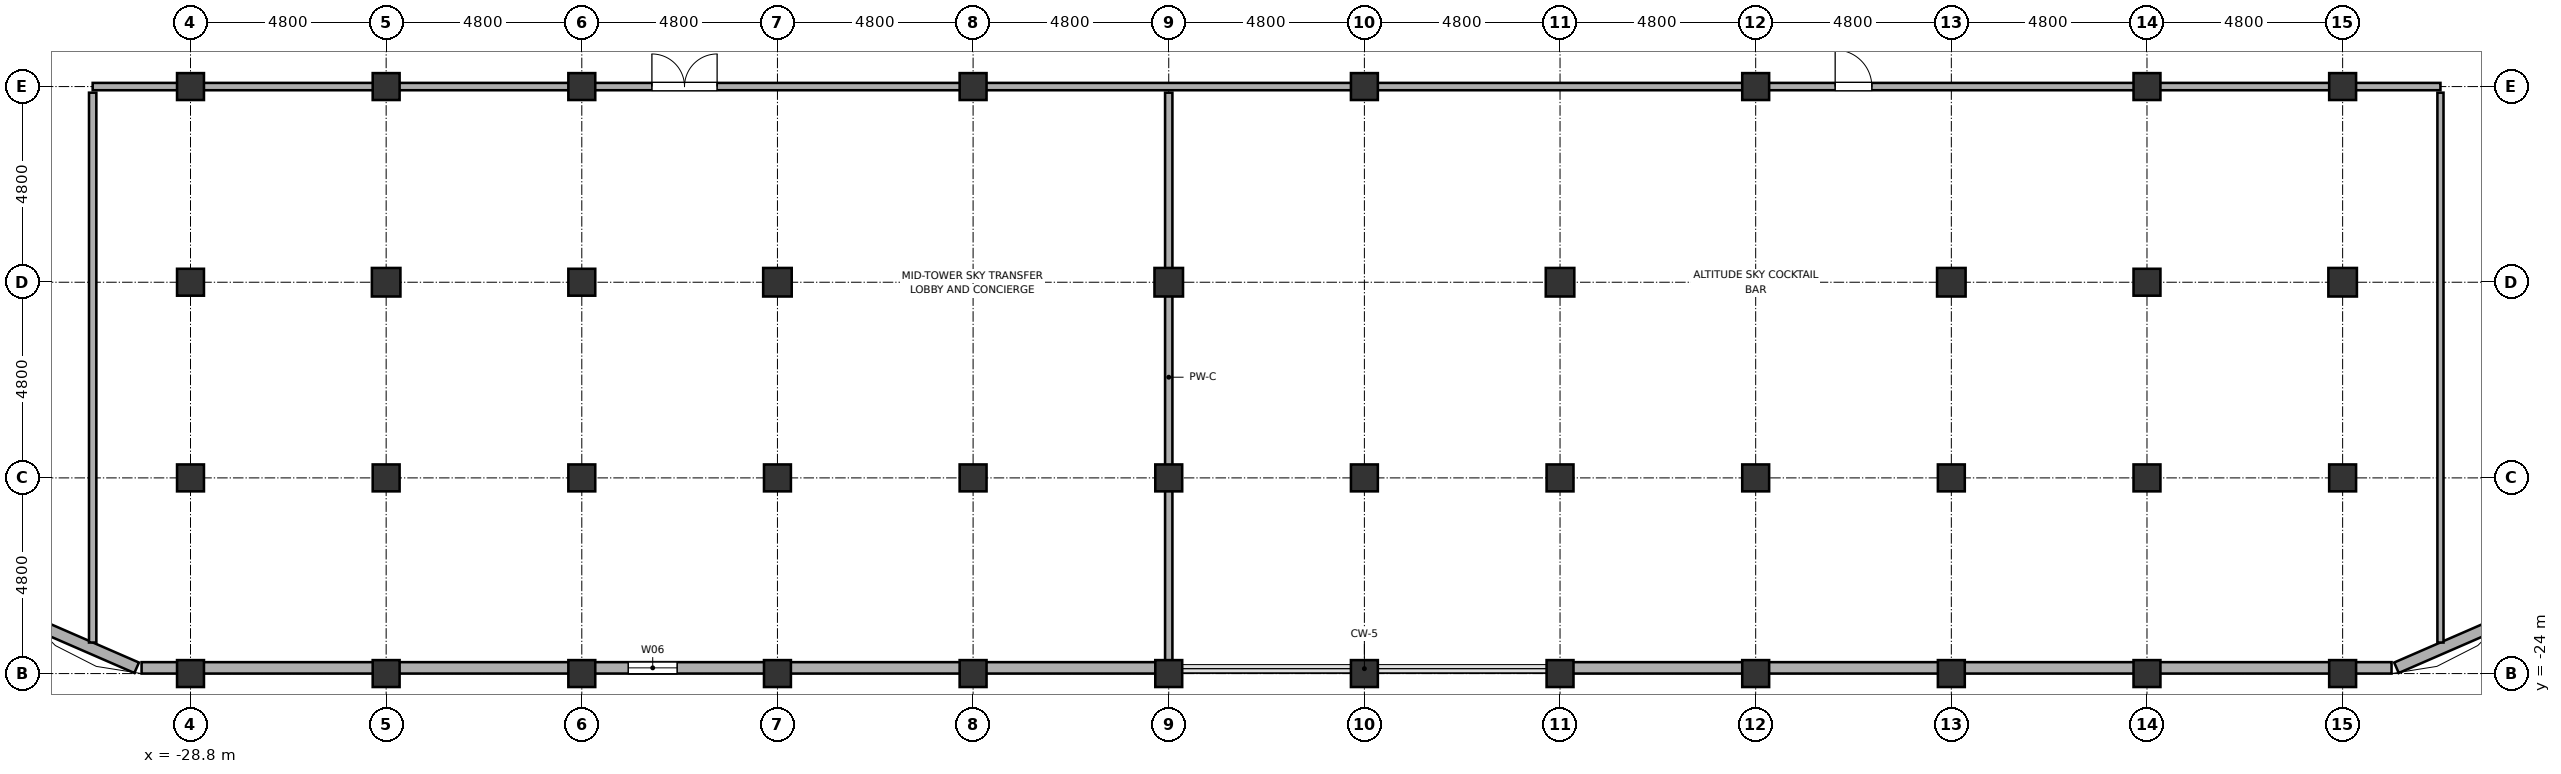
"""IFC4 building model, lengths in metres.
Left out: names, types, materials, properties, quantities, classifications, styles, units other than length and angle.
Written with IfcOpenShell. Run it as: python <this file> out.ifc"""

import sys

from ifc_helpers import new_model, si_unit, direction, frame, frame_2d, origin, origin_2d, place, context, subcontext, project, spatial, rectangle, hollow_rectangle, hollow_circle, extrude, element, fill, save


model = new_model("IFC4")
c1 = context("Model", 3, precision=1e-05, world=origin(), true_north=direction((0.0, 1.0)))
c2 = subcontext(c1, "Body", "Model", "MODEL_VIEW")
j1 = project(units=[si_unit("LENGTHUNIT", "METRE"), si_unit("PLANEANGLEUNIT", "RADIAN")], contexts=[c1])
p1 = place(None, origin())
s1 = spatial("IfcSite", under=j1, at=p1, CompositionType="ELEMENT")
p2 = place(p1, origin())
s2 = spatial("IfcBuilding", under=s1, at=p2, CompositionType="ELEMENT")
p3 = place(p2, frame((0.0, 0.0, 180.3)))
s3 = spatial("IfcBuildingStorey", under=s2, at=p3, CompositionType="ELEMENT", Elevation=180.3)
for number, where, z_axis, x_axis in (
    (1, (-28.8, -24.0, 0.0), (0.0, 0.0, 1.0), (1.0, 0.0, 0.0)),
    (2, (-28.8, -19.2, 0.0), (0.0, 0.0, 1.0), (1.0, 0.0, 0.0)),
    (3, (-28.8, -14.4, 0.0), (0.0, 0.0, 1.0), (1.0, 0.0, 0.0)),
    (4, (-28.8, -9.6, 0.0), (0.0, 0.0, 1.0), (1.0, 0.0, 0.0)),
    (5, (-24.0, -24.0, 0.0), (0.0, 0.0, 1.0), (1.0, 0.0, 0.0)),
    (6, (-24.0, -19.2, 0.0), (0.0, 0.0, 1.0), (1.0, 0.0, 0.0)),
):
    element("IfcColumn", number, at=place(p3, frame(where, z_axis=z_axis, x_axis=x_axis)), inside=s3, PredefinedType="COLUMN", context=c2, shape_type="SweptSolid", body=[
        extrude(hollow_circle(Radius=0.33, WallThickness=0.028, at=origin_2d()), origin(), (0.0, 0.0, 1.0), 5.2),
    ])
p4 = place(p3, frame((-24.0, -14.4, 0.0), z_axis=(0.0, 0.0, 1.0), x_axis=(1.0, 0.0, 0.0)))
e7 = element("IfcColumn", 7, at=p4, inside=s3, PredefinedType="COLUMN", context=c2, shape_type="SweptSolid", body=[
    extrude(hollow_rectangle(XDim=0.7, YDim=0.7, WallThickness=0.032, at=origin_2d()), origin(), (0.0, 0.0, 1.0), 5.2),
])
for number, where, z_axis, x_axis in (
    (8, (-24.0, -9.6, 0.0), (0.0, 0.0, 1.0), (1.0, 0.0, 0.0)),
    (9, (-19.2, -24.0, 0.0), (0.0, 0.0, 1.0), (1.0, 0.0, 0.0)),
    (10, (-19.2, -19.2, 0.0), (0.0, 0.0, 1.0), (1.0, 0.0, 0.0)),
    (11, (-19.2, -14.4, 0.0), (0.0, 0.0, 1.0), (1.0, 0.0, 0.0)),
    (12, (-19.2, -9.6, 0.0), (0.0, 0.0, 1.0), (1.0, 0.0, 0.0)),
    (13, (-14.4, -24.0, 0.0), (0.0, 0.0, 1.0), (1.0, 0.0, 0.0)),
    (14, (-14.4, -19.2, 0.0), (0.0, 0.0, 1.0), (1.0, 0.0, 0.0)),
):
    element("IfcColumn", number, at=place(p3, frame(where, z_axis=z_axis, x_axis=x_axis)), inside=s3, PredefinedType="COLUMN", context=c2, shape_type="SweptSolid", body=[
        extrude(hollow_circle(Radius=0.33, WallThickness=0.028, at=origin_2d()), origin(), (0.0, 0.0, 1.0), 5.2),
    ])
p5 = place(p3, frame((-14.4, -14.4, 0.0), z_axis=(0.0, 0.0, 1.0), x_axis=(1.0, 0.0, 0.0)))
e15 = element("IfcColumn", 15, at=p5, inside=s3, PredefinedType="COLUMN", context=c2, shape_type="SweptSolid", body=[
    extrude(hollow_rectangle(XDim=0.7, YDim=0.7, WallThickness=0.032, at=origin_2d()), origin(), (0.0, 0.0, 1.0), 5.2),
])
for number, where, z_axis, x_axis in (
    (16, (-9.6, -24.0, 0.0), (0.0, 0.0, 1.0), (1.0, 0.0, 0.0)),
    (17, (-9.6, -19.2, 0.0), (0.0, 0.0, 1.0), (1.0, 0.0, 0.0)),
    (18, (-9.6, -9.6, 0.0), (0.0, 0.0, 1.0), (1.0, 0.0, 0.0)),
    (19, (-4.8, -24.0, 0.0), (0.0, 0.0, 1.0), (1.0, 0.0, 0.0)),
    (20, (-4.8, -19.2, 0.0), (0.0, 0.0, 1.0), (1.0, 0.0, 0.0)),
):
    element("IfcColumn", number, at=place(p3, frame(where, z_axis=z_axis, x_axis=x_axis)), inside=s3, PredefinedType="COLUMN", context=c2, shape_type="SweptSolid", body=[
        extrude(hollow_circle(Radius=0.33, WallThickness=0.028, at=origin_2d()), origin(), (0.0, 0.0, 1.0), 5.2),
    ])
p6 = place(p3, frame((-4.8, -14.4, 0.0), z_axis=(0.0, 0.0, 1.0), x_axis=(1.0, 0.0, 0.0)))
e21 = element("IfcColumn", 21, at=p6, inside=s3, PredefinedType="COLUMN", context=c2, shape_type="SweptSolid", body=[
    extrude(hollow_rectangle(XDim=0.7, YDim=0.7, WallThickness=0.032, at=origin_2d()), origin(), (0.0, 0.0, 1.0), 5.2),
])
for number, where, z_axis, x_axis in (
    (22, (0.0, -24.0, 0.0), (0.0, 0.0, 1.0), (1.0, 0.0, 0.0)),
    (23, (0.0, -19.2, 0.0), (0.0, 0.0, 1.0), (1.0, 0.0, 0.0)),
    (24, (0.0, -9.6, 0.0), (0.0, 0.0, 1.0), (1.0, 0.0, 0.0)),
    (25, (4.8, -24.0, 0.0), (0.0, 0.0, 1.0), (1.0, 0.0, 0.0)),
    (26, (4.8, -19.2, 0.0), (0.0, 0.0, 1.0), (1.0, 0.0, 0.0)),
):
    element("IfcColumn", number, at=place(p3, frame(where, z_axis=z_axis, x_axis=x_axis)), inside=s3, PredefinedType="COLUMN", context=c2, shape_type="SweptSolid", body=[
        extrude(hollow_circle(Radius=0.33, WallThickness=0.028, at=origin_2d()), origin(), (0.0, 0.0, 1.0), 5.2),
    ])
p7 = place(p3, frame((4.8, -14.4, 0.0), z_axis=(0.0, 0.0, 1.0), x_axis=(1.0, 0.0, 0.0)))
e27 = element("IfcColumn", 27, at=p7, inside=s3, PredefinedType="COLUMN", context=c2, shape_type="SweptSolid", body=[
    extrude(hollow_rectangle(XDim=0.7, YDim=0.7, WallThickness=0.032, at=origin_2d()), origin(), (0.0, 0.0, 1.0), 5.2),
])
for number, where, z_axis, x_axis in (
    (28, (9.6, -24.0, 0.0), (0.0, 0.0, 1.0), (1.0, 0.0, 0.0)),
    (29, (9.6, -19.2, 0.0), (0.0, 0.0, 1.0), (1.0, 0.0, 0.0)),
    (30, (9.6, -9.6, 0.0), (0.0, 0.0, 1.0), (1.0, 0.0, 0.0)),
    (31, (14.4, -24.0, 0.0), (0.0, 0.0, 1.0), (1.0, 0.0, 0.0)),
    (32, (14.4, -19.2, 0.0), (0.0, 0.0, 1.0), (1.0, 0.0, 0.0)),
):
    element("IfcColumn", number, at=place(p3, frame(where, z_axis=z_axis, x_axis=x_axis)), inside=s3, PredefinedType="COLUMN", context=c2, shape_type="SweptSolid", body=[
        extrude(hollow_circle(Radius=0.33, WallThickness=0.028, at=origin_2d()), origin(), (0.0, 0.0, 1.0), 5.2),
    ])
p8 = place(p3, frame((14.4, -14.4, 0.0), z_axis=(0.0, 0.0, 1.0), x_axis=(1.0, 0.0, 0.0)))
e33 = element("IfcColumn", 33, at=p8, inside=s3, PredefinedType="COLUMN", context=c2, shape_type="SweptSolid", body=[
    extrude(hollow_rectangle(XDim=0.7, YDim=0.7, WallThickness=0.032, at=origin_2d()), origin(), (0.0, 0.0, 1.0), 5.2),
])
for number, where, z_axis, x_axis in (
    (34, (19.2, -24.0, 0.0), (0.0, 0.0, 1.0), (1.0, 0.0, 0.0)),
    (35, (19.2, -19.2, 0.0), (0.0, 0.0, 1.0), (1.0, 0.0, 0.0)),
    (36, (19.2, -14.4, 0.0), (0.0, 0.0, 1.0), (1.0, 0.0, 0.0)),
    (37, (19.2, -9.6, 0.0), (0.0, 0.0, 1.0), (1.0, 0.0, 0.0)),
    (38, (24.0, -24.0, 0.0), (0.0, 0.0, 1.0), (1.0, 0.0, 0.0)),
    (39, (24.0, -19.2, 0.0), (0.0, 0.0, 1.0), (1.0, 0.0, 0.0)),
):
    element("IfcColumn", number, at=place(p3, frame(where, z_axis=z_axis, x_axis=x_axis)), inside=s3, PredefinedType="COLUMN", context=c2, shape_type="SweptSolid", body=[
        extrude(hollow_circle(Radius=0.33, WallThickness=0.028, at=origin_2d()), origin(), (0.0, 0.0, 1.0), 5.2),
    ])
p9 = place(p3, frame((24.0, -14.4, 0.0), z_axis=(0.0, 0.0, 1.0), x_axis=(1.0, 0.0, 0.0)))
e40 = element("IfcColumn", 40, at=p9, inside=s3, PredefinedType="COLUMN", context=c2, shape_type="SweptSolid", body=[
    extrude(hollow_rectangle(XDim=0.7, YDim=0.7, WallThickness=0.032, at=origin_2d()), origin(), (0.0, 0.0, 1.0), 5.2),
])
p10 = place(p3, frame((24.0, -9.6, 0.0), z_axis=(0.0, 0.0, 1.0), x_axis=(1.0, 0.0, 0.0)))
e41 = element("IfcColumn", 41, at=p10, inside=s3, PredefinedType="COLUMN", context=c2, shape_type="SweptSolid", body=[
    extrude(hollow_circle(Radius=0.33, WallThickness=0.028, at=origin_2d()), origin(), (0.0, 0.0, 1.0), 5.2),
])
for number, where, z_axis, x_axis in (
    (42, (-32.447, -22.847, 0.0), (0.0, 0.0, 1.0), (0.917, -0.399, 0.0)),
    (43, (25.321, -23.858, 0.0), (0.0, 0.0, 1.0), (0.917, 0.399, 0.0)),
):
    element("IfcWall", number, at=place(p3, frame(where, z_axis=z_axis, x_axis=x_axis)), inside=s3, PredefinedType="SOLIDWALL", context=c2, shape_type="SweptSolid", body=[
        extrude(rectangle(XDim=2.536, YDim=0.28, at=frame_2d((1.268, 0.0))), origin(), (0.0, 0.0, 1.0), 3.55),
    ])
p11 = place(p3, frame((-30.0, -23.86, 0.0), z_axis=(0.0, 0.0, 1.0), x_axis=(1.0, 0.0, 0.0)))
e44 = element("IfcWall", 44, at=p11, inside=s3, PredefinedType="SOLIDWALL", context=c2, shape_type="SweptSolid", body=[
    extrude(rectangle(XDim=25.25, YDim=0.28, at=frame_2d((12.625, 0.0))), origin(), (0.0, 0.0, 1.0), 3.55),
])
p12 = place(p11, frame((11.94, 0.0, 0.75)))
e45 = element("IfcOpeningElement", 45, at=p12, cuts=e44, PredefinedType="OPENING", context=c2, shape_type="SweptSolid", body=[
    extrude(rectangle(XDim=1.2, YDim=1.7, at=frame_2d((0.6, 0.85))), frame((0.0, 0.155, 0.0), z_axis=(0.0, -1.0, 0.0), x_axis=(1.0, 0.0, 0.0)), (0.0, 0.0, 1.0), 0.31),
])
p13 = place(p3, frame((4.75, -23.86, 0.0), z_axis=(0.0, 0.0, 1.0), x_axis=(1.0, 0.0, 0.0)))
e46 = element("IfcWall", 46, at=p13, inside=s3, PredefinedType="SOLIDWALL", context=c2, shape_type="SweptSolid", body=[
    extrude(rectangle(XDim=20.45, YDim=0.28, at=frame_2d((10.225, 0.0))), origin(), (0.0, 0.0, 1.0), 3.55),
])
p14 = place(p3, frame((-31.2, -9.6, 0.0), z_axis=(0.0, 0.0, 1.0), x_axis=(1.0, 0.0, 0.0)))
e47 = element("IfcWall", 47, at=p14, inside=s3, PredefinedType="PARTITIONING", context=c2, shape_type="SweptSolid", body=[
    extrude(rectangle(XDim=57.6, YDim=0.18, at=frame_2d((28.8, 0.0))), origin(), (0.0, 0.0, 1.0), 3.55),
])
p15 = place(p14, frame((13.72, 0.0, 0.0)))
e48 = element("IfcOpeningElement", 48, at=p15, cuts=e47, PredefinedType="OPENING", context=c2, shape_type="SweptSolid", body=[
    extrude(rectangle(XDim=1.6, YDim=2.3, at=frame_2d((0.8, 1.15))), frame((0.0, 0.105, 0.0), z_axis=(0.0, -1.0, 0.0), x_axis=(1.0, 0.0, 0.0)), (0.0, 0.0, 1.0), 0.21),
])
p16 = place(p14, frame((42.75, 0.0, 0.0)))
e49 = element("IfcOpeningElement", 49, at=p16, cuts=e47, PredefinedType="OPENING", context=c2, shape_type="SweptSolid", body=[
    extrude(rectangle(XDim=0.9, YDim=2.1, at=frame_2d((0.45, 1.05))), frame((0.0, 0.105, 0.0), z_axis=(0.0, -1.0, 0.0), x_axis=(1.0, 0.0, 0.0)), (0.0, 0.0, 1.0), 0.21),
])
p17 = place(p3, frame((-31.2, -23.239, 0.0), z_axis=(0.0, 0.0, 1.0), x_axis=(0.0, 1.0, 0.0)))
e50 = element("IfcWall", 50, at=p17, inside=s3, PredefinedType="PARTITIONING", context=c2, shape_type="SweptSolid", body=[
    extrude(rectangle(XDim=13.489, YDim=0.18, at=frame_2d((6.744, 0.0))), origin(), (0.0, 0.0, 1.0), 3.55),
])
p18 = place(p3, frame((-4.8, -23.71, 0.0), z_axis=(0.0, 0.0, 1.0), x_axis=(0.0, 1.0, 0.0)))
e51 = element("IfcWall", 51, at=p18, inside=s3, PredefinedType="PARTITIONING", context=c2, shape_type="SweptSolid", body=[
    extrude(rectangle(XDim=13.96, YDim=0.18, at=frame_2d((6.98, 0.0))), origin(), (0.0, 0.0, 1.0), 3.55),
])
p19 = place(p3, frame((26.4, -23.239, 0.0), z_axis=(0.0, 0.0, 1.0), x_axis=(0.0, 1.0, 0.0)))
e52 = element("IfcWall", 52, at=p19, inside=s3, PredefinedType="PARTITIONING", context=c2, shape_type="SweptSolid", body=[
    extrude(rectangle(XDim=13.489, YDim=0.15, at=frame_2d((6.744, 0.0))), origin(), (0.0, 0.0, 1.0), 3.55),
])
p20 = place(p12, origin())
e53 = element("IfcWindow", 53, at=p20, inside=s3, PartitioningType="SINGLE_PANEL", PredefinedType="WINDOW", context=c2, shape_type="SweptSolid", body=[
    extrude(rectangle(XDim=1.2, YDim=1.7, at=frame_2d((0.6, 0.85))), frame((0.0, 0.03, 0.0), z_axis=(0.0, -1.0, 0.0), x_axis=(1.0, 0.0, 0.0)), (0.0, 0.0, 1.0), 0.06),
])
fill(e45, e53)
p21 = place(p15, origin())
e54 = element("IfcDoor", 54, at=p21, inside=s3, OperationType="DOUBLE_DOOR_SINGLE_SWING", PredefinedType="DOOR", context=c2, shape_type="SweptSolid", body=[
    extrude(rectangle(XDim=1.6, YDim=2.3, at=frame_2d((0.8, 1.15))), frame((0.0, 0.025, 0.0), z_axis=(0.0, -1.0, 0.0), x_axis=(1.0, 0.0, 0.0)), (0.0, 0.0, 1.0), 0.05),
])
fill(e48, e54)
p22 = place(p16, origin())
e55 = element("IfcDoor", 55, at=p22, inside=s3, OperationType="SINGLE_SWING_LEFT", PredefinedType="DOOR", context=c2, shape_type="SweptSolid", body=[
    extrude(rectangle(XDim=0.9, YDim=2.1, at=frame_2d((0.45, 1.05))), frame((0.0, 0.025, 0.0), z_axis=(0.0, -1.0, 0.0), x_axis=(1.0, 0.0, 0.0)), (0.0, 0.0, 1.0), 0.05),
])
fill(e49, e55)
save(model, sys.argv[1])
